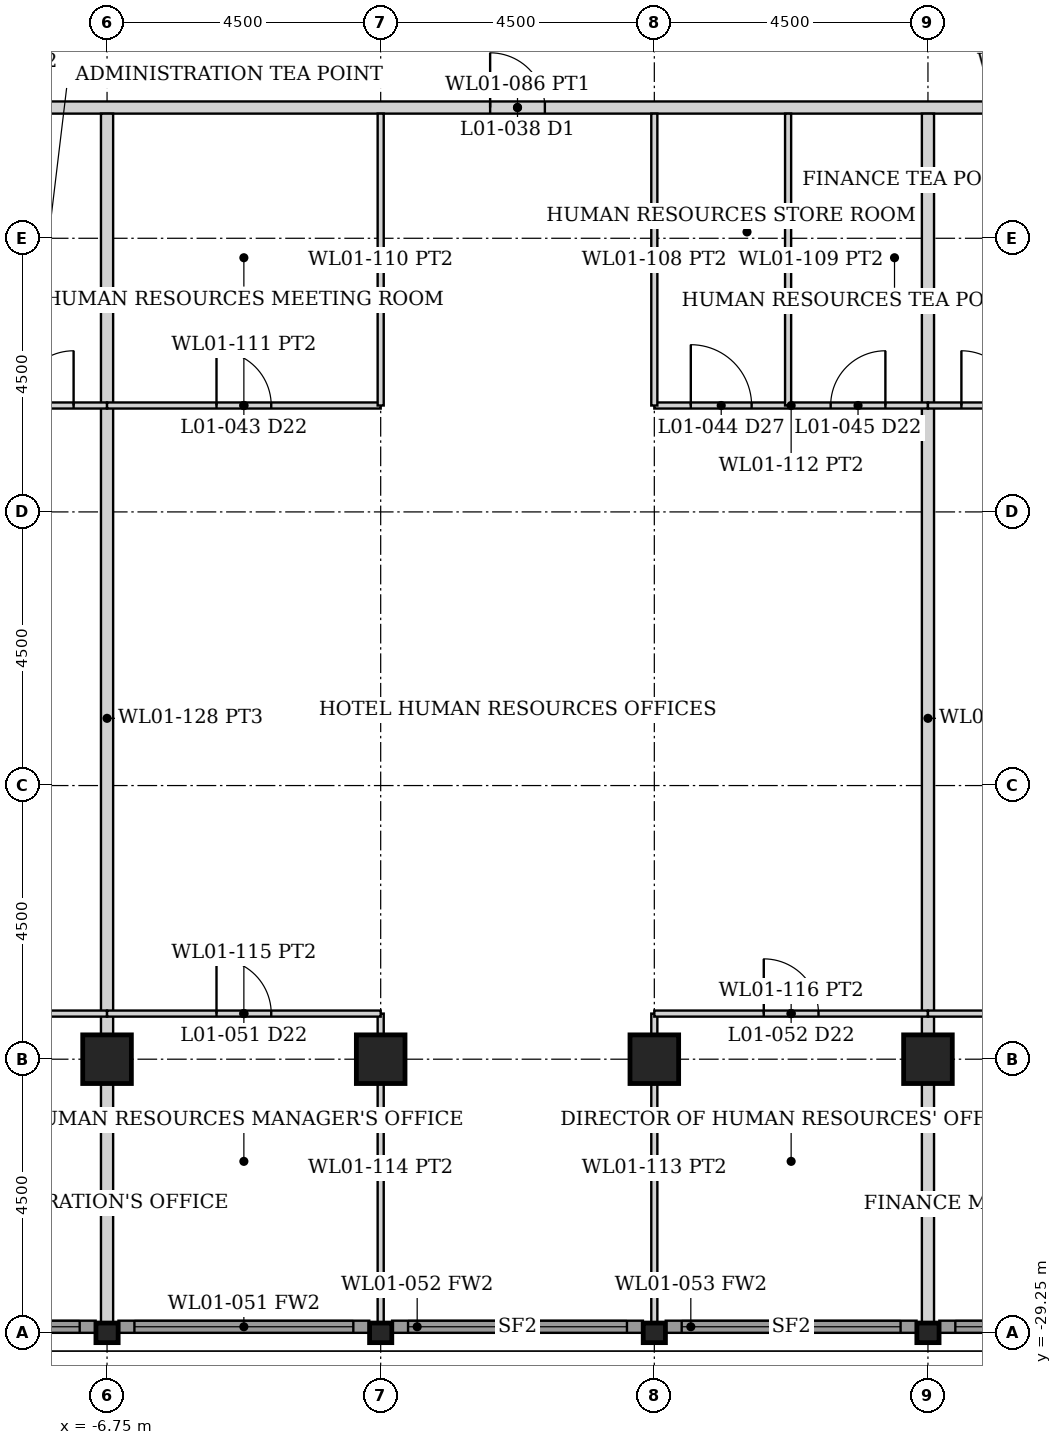
"""IFC4 building model, lengths in metres.
Left out: names, types, materials, properties, quantities, classifications, styles, units other than length and angle.
Written with IfcOpenShell. Run it as: python <this file> out.ifc"""

import sys

from ifc_helpers import new_model, si_unit, direction, frame, frame_2d, origin, origin_2d, place, context, subcontext, project, spatial, rectangle, hollow_rectangle, i_section, extrude, element, fill, save


model = new_model("IFC4")
c1 = context("Model", 3, precision=1e-05, world=origin(), true_north=direction((0.0, 1.0)))
c2 = subcontext(c1, "Body", "Model", "MODEL_VIEW")
j1 = project(units=[si_unit("LENGTHUNIT", "METRE"), si_unit("PLANEANGLEUNIT", "RADIAN")], contexts=[c1])
p1 = place(None, origin())
s1 = spatial("IfcSite", under=j1, at=p1, CompositionType="ELEMENT")
p2 = place(p1, origin())
s2 = spatial("IfcBuilding", under=s1, at=p2, CompositionType="ELEMENT")
p3 = place(p2, frame((0.0, 0.0, 6.0)))
s3 = spatial("IfcBuildingStorey", under=s2, at=p3, CompositionType="ELEMENT", Elevation=6.0)
for number, where, z_axis, x_axis in (
    (1, (-6.75, -24.75, 0.0), (0.0, 0.0, 1.0), (0.0, 1.0, 0.0)),
    (2, (-2.25, -24.75, 0.0), (0.0, 0.0, 1.0), (0.0, 1.0, 0.0)),
    (3, (2.25, -24.75, 0.0), (0.0, 0.0, 1.0), (0.0, 1.0, 0.0)),
    (4, (6.75, -24.75, 0.0), (0.0, 0.0, 1.0), (0.0, 1.0, 0.0)),
):
    element("IfcColumn", number, at=place(p3, frame(where, z_axis=z_axis, x_axis=x_axis)), inside=s3, PredefinedType="COLUMN", context=c2, shape_type="SweptSolid", body=[
        extrude(hollow_rectangle(XDim=0.8, YDim=0.8, WallThickness=0.08, at=origin_2d()), origin(), (0.0, 0.0, 1.0), 5.0),
    ])
for number, where, z_axis, x_axis in (
    (5, (-6.75, -29.25, 0.0), (0.0, 0.0, 1.0), (0.0, 1.0, 0.0)),
    (6, (-2.25, -29.25, 0.0), (0.0, 0.0, 1.0), (0.0, 1.0, 0.0)),
    (7, (2.25, -29.25, 0.0), (0.0, 0.0, 1.0), (0.0, 1.0, 0.0)),
    (8, (6.75, -29.25, 0.0), (0.0, 0.0, 1.0), (0.0, 1.0, 0.0)),
):
    element("IfcColumn", number, at=place(p3, frame(where, z_axis=z_axis, x_axis=x_axis)), inside=s3, PredefinedType="COLUMN", context=c2, shape_type="SweptSolid", body=[
        extrude(i_section(OverallWidth=0.322, OverallDepth=0.365, WebThickness=0.027, FlangeThickness=0.044, FilletRadius=0.015, at=origin_2d()), origin(), (0.0, 0.0, 1.0), 5.0),
    ])
p4 = place(p3, frame((-11.062, -29.15, 0.0), z_axis=(0.0, 0.0, 1.0), x_axis=(1.0, 0.0, 0.0)))
e9 = element("IfcWall", 9, at=p4, inside=s3, PredefinedType="SOLIDWALL", context=c2, shape_type="SweptSolid", body=[
    extrude(rectangle(XDim=4.125, YDim=0.2, at=frame_2d((2.062, 0.0))), origin(), (0.0, 0.0, 1.0), 4.133),
])
p5 = place(p4, frame((0.262, 0.0, 0.15)))
e10 = element("IfcOpeningElement", 10, at=p5, cuts=e9, PredefinedType="OPENING", context=c2, shape_type="SweptSolid", body=[
    extrude(rectangle(XDim=3.6, YDim=3.833, at=frame_2d((1.8, 1.917))), frame((0.0, 0.11, 0.0), z_axis=(0.0, -1.0, 0.0), x_axis=(1.0, 0.0, 0.0)), (0.0, 0.0, 1.0), 0.22),
])
p6 = place(p3, frame((-6.562, -29.15, 0.0), z_axis=(0.0, 0.0, 1.0), x_axis=(1.0, 0.0, 0.0)))
e11 = element("IfcWall", 11, at=p6, inside=s3, PredefinedType="SOLIDWALL", context=c2, shape_type="SweptSolid", body=[
    extrude(rectangle(XDim=4.125, YDim=0.2, at=frame_2d((2.062, 0.0))), origin(), (0.0, 0.0, 1.0), 4.133),
])
p7 = place(p6, frame((0.262, 0.0, 0.15)))
e12 = element("IfcOpeningElement", 12, at=p7, cuts=e11, PredefinedType="OPENING", context=c2, shape_type="SweptSolid", body=[
    extrude(rectangle(XDim=3.6, YDim=3.833, at=frame_2d((1.8, 1.917))), frame((0.0, 0.11, 0.0), z_axis=(0.0, -1.0, 0.0), x_axis=(1.0, 0.0, 0.0)), (0.0, 0.0, 1.0), 0.22),
])
p8 = place(p3, frame((-2.062, -29.15, 0.0), z_axis=(0.0, 0.0, 1.0), x_axis=(1.0, 0.0, 0.0)))
e13 = element("IfcWall", 13, at=p8, inside=s3, PredefinedType="SOLIDWALL", context=c2, shape_type="SweptSolid", body=[
    extrude(rectangle(XDim=4.125, YDim=0.2, at=frame_2d((2.062, 0.0))), origin(), (0.0, 0.0, 1.0), 4.133),
])
p9 = place(p8, frame((0.262, 0.0, 0.15)))
e14 = element("IfcOpeningElement", 14, at=p9, cuts=e13, PredefinedType="OPENING", context=c2, shape_type="SweptSolid", body=[
    extrude(rectangle(XDim=3.6, YDim=3.833, at=frame_2d((1.8, 1.917))), frame((0.0, 0.11, 0.0), z_axis=(0.0, -1.0, 0.0), x_axis=(1.0, 0.0, 0.0)), (0.0, 0.0, 1.0), 0.22),
])
p10 = place(p3, frame((2.438, -29.15, 0.0), z_axis=(0.0, 0.0, 1.0), x_axis=(1.0, 0.0, 0.0)))
e15 = element("IfcWall", 15, at=p10, inside=s3, PredefinedType="SOLIDWALL", context=c2, shape_type="SweptSolid", body=[
    extrude(rectangle(XDim=4.125, YDim=0.2, at=frame_2d((2.062, 0.0))), origin(), (0.0, 0.0, 1.0), 4.133),
])
p11 = place(p10, frame((0.262, 0.0, 0.15)))
e16 = element("IfcOpeningElement", 16, at=p11, cuts=e15, PredefinedType="OPENING", context=c2, shape_type="SweptSolid", body=[
    extrude(rectangle(XDim=3.6, YDim=3.833, at=frame_2d((1.8, 1.917))), frame((0.0, 0.11, 0.0), z_axis=(0.0, -1.0, 0.0), x_axis=(1.0, 0.0, 0.0)), (0.0, 0.0, 1.0), 0.22),
])
p12 = place(p3, frame((6.938, -29.15, 0.0), z_axis=(0.0, 0.0, 1.0), x_axis=(1.0, 0.0, 0.0)))
e17 = element("IfcWall", 17, at=p12, inside=s3, PredefinedType="SOLIDWALL", context=c2, shape_type="SweptSolid", body=[
    extrude(rectangle(XDim=4.125, YDim=0.2, at=frame_2d((2.062, 0.0))), origin(), (0.0, 0.0, 1.0), 4.133),
])
p13 = place(p12, frame((0.262, 0.0, 0.15)))
e18 = element("IfcOpeningElement", 18, at=p13, cuts=e17, PredefinedType="OPENING", context=c2, shape_type="SweptSolid", body=[
    extrude(rectangle(XDim=3.6, YDim=3.833, at=frame_2d((1.8, 1.917))), frame((0.0, 0.11, 0.0), z_axis=(0.0, -1.0, 0.0), x_axis=(1.0, 0.0, 0.0)), (0.0, 0.0, 1.0), 0.22),
])
p14 = place(p3, frame((-25.075, -9.1, 0.0), z_axis=(0.0, 0.0, 1.0), x_axis=(1.0, 0.0, 0.0)))
e19 = element("IfcWall", 19, at=p14, inside=s3, PredefinedType="PARTITIONING", context=c2, shape_type="SweptSolid", body=[
    extrude(rectangle(XDim=50.15, YDim=0.2, at=frame_2d((25.075, 0.0))), origin(), (0.0, 0.0, 1.0), 3.829),
])
p15 = place(p14, frame((6.85, 0.0, 0.0)))
e20 = element("IfcOpeningElement", 20, at=p15, cuts=e19, PredefinedType="OPENING", context=c2, shape_type="SweptSolid", body=[
    extrude(rectangle(XDim=0.9, YDim=2.1, at=frame_2d((0.45, 1.05))), frame((0.0, 0.11, 0.0), z_axis=(0.0, -1.0, 0.0), x_axis=(1.0, 0.0, 0.0)), (0.0, 0.0, 1.0), 0.22),
])
p16 = place(p14, frame((24.625, 0.0, 0.0)))
e21 = element("IfcOpeningElement", 21, at=p16, cuts=e19, PredefinedType="OPENING", context=c2, shape_type="SweptSolid", body=[
    extrude(rectangle(XDim=0.9, YDim=2.1, at=frame_2d((0.45, 1.05))), frame((0.0, 0.11, 0.0), z_axis=(0.0, -1.0, 0.0), x_axis=(1.0, 0.0, 0.0)), (0.0, 0.0, 1.0), 0.22),
])
p17 = place(p14, frame((42.4, 0.0, 0.0)))
e22 = element("IfcOpeningElement", 22, at=p17, cuts=e19, PredefinedType="OPENING", context=c2, shape_type="SweptSolid", body=[
    extrude(rectangle(XDim=0.9, YDim=2.1, at=frame_2d((0.45, 1.05))), frame((0.0, 0.11, 0.0), z_axis=(0.0, -1.0, 0.0), x_axis=(1.0, 0.0, 0.0)), (0.0, 0.0, 1.0), 0.22),
])
for number, where, z_axis, x_axis in (
    (23, (-6.75, -29.089, 0.0), (0.0, 0.0, 1.0), (0.0, 1.0, 0.0)),
    (24, (6.75, -29.089, 0.0), (0.0, 0.0, 1.0), (0.0, 1.0, 0.0)),
):
    element("IfcWall", number, at=place(p3, frame(where, z_axis=z_axis, x_axis=x_axis)), inside=s3, PredefinedType="PARTITIONING", context=c2, shape_type="SweptSolid", body=[
        extrude(rectangle(XDim=19.889, YDim=0.2, at=frame_2d((9.944, 0.0))), origin(), (0.0, 0.0, 1.0), 3.829),
    ])
p18 = place(p3, frame((-15.75, -14.0, 0.0), z_axis=(0.0, 0.0, 1.0), x_axis=(1.0, 0.0, 0.0)))
e25 = element("IfcWall", 25, at=p18, inside=s3, PredefinedType="PARTITIONING", context=c2, shape_type="SweptSolid", body=[
    extrude(rectangle(XDim=9.0, YDim=0.1, at=frame_2d((4.5, 0.0))), origin(), (0.0, 0.0, 1.0), 3.829),
])
p19 = place(p18, frame((1.95, 0.0, 0.0)))
e26 = element("IfcOpeningElement", 26, at=p19, cuts=e25, PredefinedType="OPENING", context=c2, shape_type="SweptSolid", body=[
    extrude(rectangle(XDim=0.9, YDim=2.1, at=frame_2d((0.45, 1.05))), frame((0.0, 0.06, 0.0), z_axis=(0.0, -1.0, 0.0), x_axis=(1.0, 0.0, 0.0)), (0.0, 0.0, 1.0), 0.12),
])
p20 = place(p18, frame((5.4, 0.0, 0.0)))
e27 = element("IfcOpeningElement", 27, at=p20, cuts=e25, PredefinedType="OPENING", context=c2, shape_type="SweptSolid", body=[
    extrude(rectangle(XDim=1.0, YDim=2.1, at=frame_2d((0.5, 1.05))), frame((0.0, 0.06, 0.0), z_axis=(0.0, -1.0, 0.0), x_axis=(1.0, 0.0, 0.0)), (0.0, 0.0, 1.0), 0.12),
])
p21 = place(p18, frame((7.55, 0.0, 0.0)))
e28 = element("IfcOpeningElement", 28, at=p21, cuts=e25, PredefinedType="OPENING", context=c2, shape_type="SweptSolid", body=[
    extrude(rectangle(XDim=0.9, YDim=2.1, at=frame_2d((0.45, 1.05))), frame((0.0, 0.06, 0.0), z_axis=(0.0, -1.0, 0.0), x_axis=(1.0, 0.0, 0.0)), (0.0, 0.0, 1.0), 0.12),
])
p22 = place(p3, frame((-11.25, -24.0, 0.0), z_axis=(0.0, 0.0, 1.0), x_axis=(1.0, 0.0, 0.0)))
e29 = element("IfcWall", 29, at=p22, inside=s3, PredefinedType="PARTITIONING", context=c2, shape_type="SweptSolid", body=[
    extrude(rectangle(XDim=4.5, YDim=0.1, at=frame_2d((2.25, 0.0))), origin(), (0.0, 0.0, 1.0), 3.829),
])
p23 = place(p22, frame((1.8, 0.0, 0.0)))
e30 = element("IfcOpeningElement", 30, at=p23, cuts=e29, PredefinedType="OPENING", context=c2, shape_type="SweptSolid", body=[
    extrude(rectangle(XDim=0.9, YDim=2.1, at=frame_2d((0.45, 1.05))), frame((0.0, 0.06, 0.0), z_axis=(0.0, -1.0, 0.0), x_axis=(1.0, 0.0, 0.0)), (0.0, 0.0, 1.0), 0.12),
])
p24 = place(p3, frame((-6.75, -14.0, 0.0), z_axis=(0.0, 0.0, 1.0), x_axis=(1.0, 0.0, 0.0)))
e31 = element("IfcWall", 31, at=p24, inside=s3, PredefinedType="PARTITIONING", context=c2, shape_type="SweptSolid", body=[
    extrude(rectangle(XDim=4.5, YDim=0.1, at=frame_2d((2.25, 0.0))), origin(), (0.0, 0.0, 1.0), 3.829),
])
p25 = place(p24, frame((1.8, 0.0, 0.0)))
e32 = element("IfcOpeningElement", 32, at=p25, cuts=e31, PredefinedType="OPENING", context=c2, shape_type="SweptSolid", body=[
    extrude(rectangle(XDim=0.9, YDim=2.1, at=frame_2d((0.45, 1.05))), frame((0.0, 0.06, 0.0), z_axis=(0.0, -1.0, 0.0), x_axis=(1.0, 0.0, 0.0)), (0.0, 0.0, 1.0), 0.12),
])
p26 = place(p3, frame((2.25, -14.0, 0.0), z_axis=(0.0, 0.0, 1.0), x_axis=(1.0, 0.0, 0.0)))
e33 = element("IfcWall", 33, at=p26, inside=s3, PredefinedType="PARTITIONING", context=c2, shape_type="SweptSolid", body=[
    extrude(rectangle(XDim=4.5, YDim=0.1, at=frame_2d((2.25, 0.0))), origin(), (0.0, 0.0, 1.0), 3.829),
])
p27 = place(p26, frame((0.6, 0.0, 0.0)))
e34 = element("IfcOpeningElement", 34, at=p27, cuts=e33, PredefinedType="OPENING", context=c2, shape_type="SweptSolid", body=[
    extrude(rectangle(XDim=1.0, YDim=2.1, at=frame_2d((0.5, 1.05))), frame((0.0, 0.06, 0.0), z_axis=(0.0, -1.0, 0.0), x_axis=(1.0, 0.0, 0.0)), (0.0, 0.0, 1.0), 0.12),
])
p28 = place(p26, frame((2.9, 0.0, 0.0)))
e35 = element("IfcOpeningElement", 35, at=p28, cuts=e33, PredefinedType="OPENING", context=c2, shape_type="SweptSolid", body=[
    extrude(rectangle(XDim=0.9, YDim=2.1, at=frame_2d((0.45, 1.05))), frame((0.0, 0.06, 0.0), z_axis=(0.0, -1.0, 0.0), x_axis=(1.0, 0.0, 0.0)), (0.0, 0.0, 1.0), 0.12),
])
for number, where, z_axis, x_axis in (
    (36, (-2.25, -14.0, 0.0), (0.0, 0.0, 1.0), (0.0, 1.0, 0.0)),
    (37, (2.25, -14.0, 0.0), (0.0, 0.0, 1.0), (0.0, 1.0, 0.0)),
    (38, (4.45, -14.0, 0.0), (0.0, 0.0, 1.0), (0.0, 1.0, 0.0)),
):
    element("IfcWall", number, at=place(p3, frame(where, z_axis=z_axis, x_axis=x_axis)), inside=s3, PredefinedType="PARTITIONING", context=c2, shape_type="SweptSolid", body=[
        extrude(rectangle(XDim=4.8, YDim=0.1, at=frame_2d((2.4, 0.0))), origin(), (0.0, 0.0, 1.0), 3.829),
    ])
p29 = place(p3, frame((-2.25, -29.089, 0.0), z_axis=(0.0, 0.0, 1.0), x_axis=(0.0, 1.0, 0.0)))
e39 = element("IfcWall", 39, at=p29, inside=s3, PredefinedType="PARTITIONING", context=c2, shape_type="SweptSolid", body=[
    extrude(rectangle(XDim=5.089, YDim=0.1, at=frame_2d((2.544, 0.0))), origin(), (0.0, 0.0, 1.0), 3.829),
])
p30 = place(p3, frame((-6.75, -24.0, 0.0), z_axis=(0.0, 0.0, 1.0), x_axis=(1.0, 0.0, 0.0)))
e40 = element("IfcWall", 40, at=p30, inside=s3, PredefinedType="PARTITIONING", context=c2, shape_type="SweptSolid", body=[
    extrude(rectangle(XDim=4.5, YDim=0.1, at=frame_2d((2.25, 0.0))), origin(), (0.0, 0.0, 1.0), 3.829),
])
p31 = place(p30, frame((1.8, 0.0, 0.0)))
e41 = element("IfcOpeningElement", 41, at=p31, cuts=e40, PredefinedType="OPENING", context=c2, shape_type="SweptSolid", body=[
    extrude(rectangle(XDim=0.9, YDim=2.1, at=frame_2d((0.45, 1.05))), frame((0.0, 0.06, 0.0), z_axis=(0.0, -1.0, 0.0), x_axis=(1.0, 0.0, 0.0)), (0.0, 0.0, 1.0), 0.12),
])
p32 = place(p3, frame((2.25, -29.089, 0.0), z_axis=(0.0, 0.0, 1.0), x_axis=(0.0, 1.0, 0.0)))
e42 = element("IfcWall", 42, at=p32, inside=s3, PredefinedType="PARTITIONING", context=c2, shape_type="SweptSolid", body=[
    extrude(rectangle(XDim=5.089, YDim=0.1, at=frame_2d((2.544, 0.0))), origin(), (0.0, 0.0, 1.0), 3.829),
])
p33 = place(p3, frame((2.25, -24.0, 0.0), z_axis=(0.0, 0.0, 1.0), x_axis=(1.0, 0.0, 0.0)))
e43 = element("IfcWall", 43, at=p33, inside=s3, PredefinedType="PARTITIONING", context=c2, shape_type="SweptSolid", body=[
    extrude(rectangle(XDim=4.5, YDim=0.1, at=frame_2d((2.25, 0.0))), origin(), (0.0, 0.0, 1.0), 3.829),
])
p34 = place(p33, frame((1.8, 0.0, 0.0)))
e44 = element("IfcOpeningElement", 44, at=p34, cuts=e43, PredefinedType="OPENING", context=c2, shape_type="SweptSolid", body=[
    extrude(rectangle(XDim=0.9, YDim=2.1, at=frame_2d((0.45, 1.05))), frame((0.0, 0.06, 0.0), z_axis=(0.0, -1.0, 0.0), x_axis=(1.0, 0.0, 0.0)), (0.0, 0.0, 1.0), 0.12),
])
p35 = place(p3, frame((6.75, -14.0, 0.0), z_axis=(0.0, 0.0, 1.0), x_axis=(1.0, 0.0, 0.0)))
e45 = element("IfcWall", 45, at=p35, inside=s3, PredefinedType="PARTITIONING", context=c2, shape_type="SweptSolid", body=[
    extrude(rectangle(XDim=9.0, YDim=0.1, at=frame_2d((4.5, 0.0))), origin(), (0.0, 0.0, 1.0), 3.829),
])
p36 = place(p35, frame((6.15, 0.0, 0.0)))
e46 = element("IfcOpeningElement", 46, at=p36, cuts=e45, PredefinedType="OPENING", context=c2, shape_type="SweptSolid", body=[
    extrude(rectangle(XDim=0.9, YDim=2.1, at=frame_2d((0.45, 1.05))), frame((0.0, 0.06, 0.0), z_axis=(0.0, -1.0, 0.0), x_axis=(1.0, 0.0, 0.0)), (0.0, 0.0, 1.0), 0.12),
])
p37 = place(p35, frame((2.6, 0.0, 0.0)))
e47 = element("IfcOpeningElement", 47, at=p37, cuts=e45, PredefinedType="OPENING", context=c2, shape_type="SweptSolid", body=[
    extrude(rectangle(XDim=1.0, YDim=2.1, at=frame_2d((0.5, 1.05))), frame((0.0, 0.06, 0.0), z_axis=(0.0, -1.0, 0.0), x_axis=(1.0, 0.0, 0.0)), (0.0, 0.0, 1.0), 0.12),
])
p38 = place(p35, frame((0.55, 0.0, 0.0)))
e48 = element("IfcOpeningElement", 48, at=p38, cuts=e45, PredefinedType="OPENING", context=c2, shape_type="SweptSolid", body=[
    extrude(rectangle(XDim=0.9, YDim=2.1, at=frame_2d((0.45, 1.05))), frame((0.0, 0.06, 0.0), z_axis=(0.0, -1.0, 0.0), x_axis=(1.0, 0.0, 0.0)), (0.0, 0.0, 1.0), 0.12),
])
p39 = place(p3, frame((6.75, -24.0, 0.0), z_axis=(0.0, 0.0, 1.0), x_axis=(1.0, 0.0, 0.0)))
e49 = element("IfcWall", 49, at=p39, inside=s3, PredefinedType="PARTITIONING", context=c2, shape_type="SweptSolid", body=[
    extrude(rectangle(XDim=4.5, YDim=0.1, at=frame_2d((2.25, 0.0))), origin(), (0.0, 0.0, 1.0), 3.829),
])
p40 = place(p39, frame((1.8, 0.0, 0.0)))
e50 = element("IfcOpeningElement", 50, at=p40, cuts=e49, PredefinedType="OPENING", context=c2, shape_type="SweptSolid", body=[
    extrude(rectangle(XDim=0.9, YDim=2.1, at=frame_2d((0.45, 1.05))), frame((0.0, 0.06, 0.0), z_axis=(0.0, -1.0, 0.0), x_axis=(1.0, 0.0, 0.0)), (0.0, 0.0, 1.0), 0.12),
])
p41 = place(p5, origin())
e51 = element("IfcWindow", 51, at=p41, inside=s3, PartitioningType="SINGLE_PANEL", PredefinedType="WINDOW", context=c2, shape_type="SweptSolid", body=[
    extrude(rectangle(XDim=3.6, YDim=3.833, at=frame_2d((1.8, 1.917))), frame((0.0, 0.03, 0.0), z_axis=(0.0, -1.0, 0.0), x_axis=(1.0, 0.0, 0.0)), (0.0, 0.0, 1.0), 0.06),
])
fill(e10, e51)
p42 = place(p7, origin())
e52 = element("IfcWindow", 52, at=p42, inside=s3, PartitioningType="SINGLE_PANEL", PredefinedType="WINDOW", context=c2, shape_type="SweptSolid", body=[
    extrude(rectangle(XDim=3.6, YDim=3.833, at=frame_2d((1.8, 1.917))), frame((0.0, 0.03, 0.0), z_axis=(0.0, -1.0, 0.0), x_axis=(1.0, 0.0, 0.0)), (0.0, 0.0, 1.0), 0.06),
])
fill(e12, e52)
p43 = place(p9, origin())
e53 = element("IfcWindow", 53, at=p43, inside=s3, PartitioningType="SINGLE_PANEL", PredefinedType="WINDOW", context=c2, shape_type="SweptSolid", body=[
    extrude(rectangle(XDim=3.6, YDim=3.833, at=frame_2d((1.8, 1.917))), frame((0.0, 0.03, 0.0), z_axis=(0.0, -1.0, 0.0), x_axis=(1.0, 0.0, 0.0)), (0.0, 0.0, 1.0), 0.06),
])
fill(e14, e53)
p44 = place(p11, origin())
e54 = element("IfcWindow", 54, at=p44, inside=s3, PartitioningType="SINGLE_PANEL", PredefinedType="WINDOW", context=c2, shape_type="SweptSolid", body=[
    extrude(rectangle(XDim=3.6, YDim=3.833, at=frame_2d((1.8, 1.917))), frame((0.0, 0.03, 0.0), z_axis=(0.0, -1.0, 0.0), x_axis=(1.0, 0.0, 0.0)), (0.0, 0.0, 1.0), 0.06),
])
fill(e16, e54)
p45 = place(p13, origin())
e55 = element("IfcWindow", 55, at=p45, inside=s3, PartitioningType="SINGLE_PANEL", PredefinedType="WINDOW", context=c2, shape_type="SweptSolid", body=[
    extrude(rectangle(XDim=3.6, YDim=3.833, at=frame_2d((1.8, 1.917))), frame((0.0, 0.03, 0.0), z_axis=(0.0, -1.0, 0.0), x_axis=(1.0, 0.0, 0.0)), (0.0, 0.0, 1.0), 0.06),
])
fill(e18, e55)
p46 = place(p21, origin())
e56 = element("IfcDoor", 56, at=p46, inside=s3, OperationType="SINGLE_SWING_RIGHT", PredefinedType="DOOR", context=c2, shape_type="SweptSolid", body=[
    extrude(rectangle(XDim=0.9, YDim=2.1, at=frame_2d((0.45, 1.05))), frame((0.0, 0.025, 0.0), z_axis=(0.0, -1.0, 0.0), x_axis=(1.0, 0.0, 0.0)), (0.0, 0.0, 1.0), 0.05),
])
fill(e28, e56)
p47 = place(p25, origin())
e57 = element("IfcDoor", 57, at=p47, inside=s3, OperationType="SINGLE_SWING_LEFT", PredefinedType="DOOR", context=c2, shape_type="SweptSolid", body=[
    extrude(rectangle(XDim=0.9, YDim=2.1, at=frame_2d((0.45, 1.05))), frame((0.0, 0.025, 0.0), z_axis=(0.0, -1.0, 0.0), x_axis=(1.0, 0.0, 0.0)), (0.0, 0.0, 1.0), 0.05),
])
fill(e32, e57)
p48 = place(p27, origin())
e58 = element("IfcDoor", 58, at=p48, inside=s3, OperationType="SINGLE_SWING_LEFT", PredefinedType="DOOR", context=c2, shape_type="SweptSolid", body=[
    extrude(rectangle(XDim=1.0, YDim=2.1, at=frame_2d((0.5, 1.05))), frame((0.0, 0.025, 0.0), z_axis=(0.0, -1.0, 0.0), x_axis=(1.0, 0.0, 0.0)), (0.0, 0.0, 1.0), 0.05),
])
fill(e34, e58)
p49 = place(p28, origin())
e59 = element("IfcDoor", 59, at=p49, inside=s3, OperationType="SINGLE_SWING_RIGHT", PredefinedType="DOOR", context=c2, shape_type="SweptSolid", body=[
    extrude(rectangle(XDim=0.9, YDim=2.1, at=frame_2d((0.45, 1.05))), frame((0.0, 0.025, 0.0), z_axis=(0.0, -1.0, 0.0), x_axis=(1.0, 0.0, 0.0)), (0.0, 0.0, 1.0), 0.05),
])
fill(e35, e59)
p50 = place(p31, origin())
e60 = element("IfcDoor", 60, at=p50, inside=s3, OperationType="SINGLE_SWING_LEFT", PredefinedType="DOOR", context=c2, shape_type="SweptSolid", body=[
    extrude(rectangle(XDim=0.9, YDim=2.1, at=frame_2d((0.45, 1.05))), frame((0.0, 0.025, 0.0), z_axis=(0.0, -1.0, 0.0), x_axis=(1.0, 0.0, 0.0)), (0.0, 0.0, 1.0), 0.05),
])
fill(e41, e60)
p51 = place(p34, origin())
e61 = element("IfcDoor", 61, at=p51, inside=s3, OperationType="SINGLE_SWING_LEFT", PredefinedType="DOOR", context=c2, shape_type="SweptSolid", body=[
    extrude(rectangle(XDim=0.9, YDim=2.1, at=frame_2d((0.45, 1.05))), frame((0.0, 0.025, 0.0), z_axis=(0.0, -1.0, 0.0), x_axis=(1.0, 0.0, 0.0)), (0.0, 0.0, 1.0), 0.05),
])
fill(e44, e61)
p52 = place(p16, origin())
e62 = element("IfcDoor", 62, at=p52, inside=s3, OperationType="SINGLE_SWING_LEFT", PredefinedType="DOOR", context=c2, shape_type="SweptSolid", body=[
    extrude(rectangle(XDim=0.9, YDim=2.1, at=frame_2d((0.45, 1.05))), frame((0.0, 0.025, 0.0), z_axis=(0.0, -1.0, 0.0), x_axis=(1.0, 0.0, 0.0)), (0.0, 0.0, 1.0), 0.05),
])
fill(e21, e62)
p53 = place(p38, origin())
e63 = element("IfcDoor", 63, at=p53, inside=s3, OperationType="SINGLE_SWING_LEFT", PredefinedType="DOOR", context=c2, shape_type="SweptSolid", body=[
    extrude(rectangle(XDim=0.9, YDim=2.1, at=frame_2d((0.45, 1.05))), frame((0.0, 0.025, 0.0), z_axis=(0.0, -1.0, 0.0), x_axis=(1.0, 0.0, 0.0)), (0.0, 0.0, 1.0), 0.05),
])
fill(e48, e63)
save(model, sys.argv[1])
